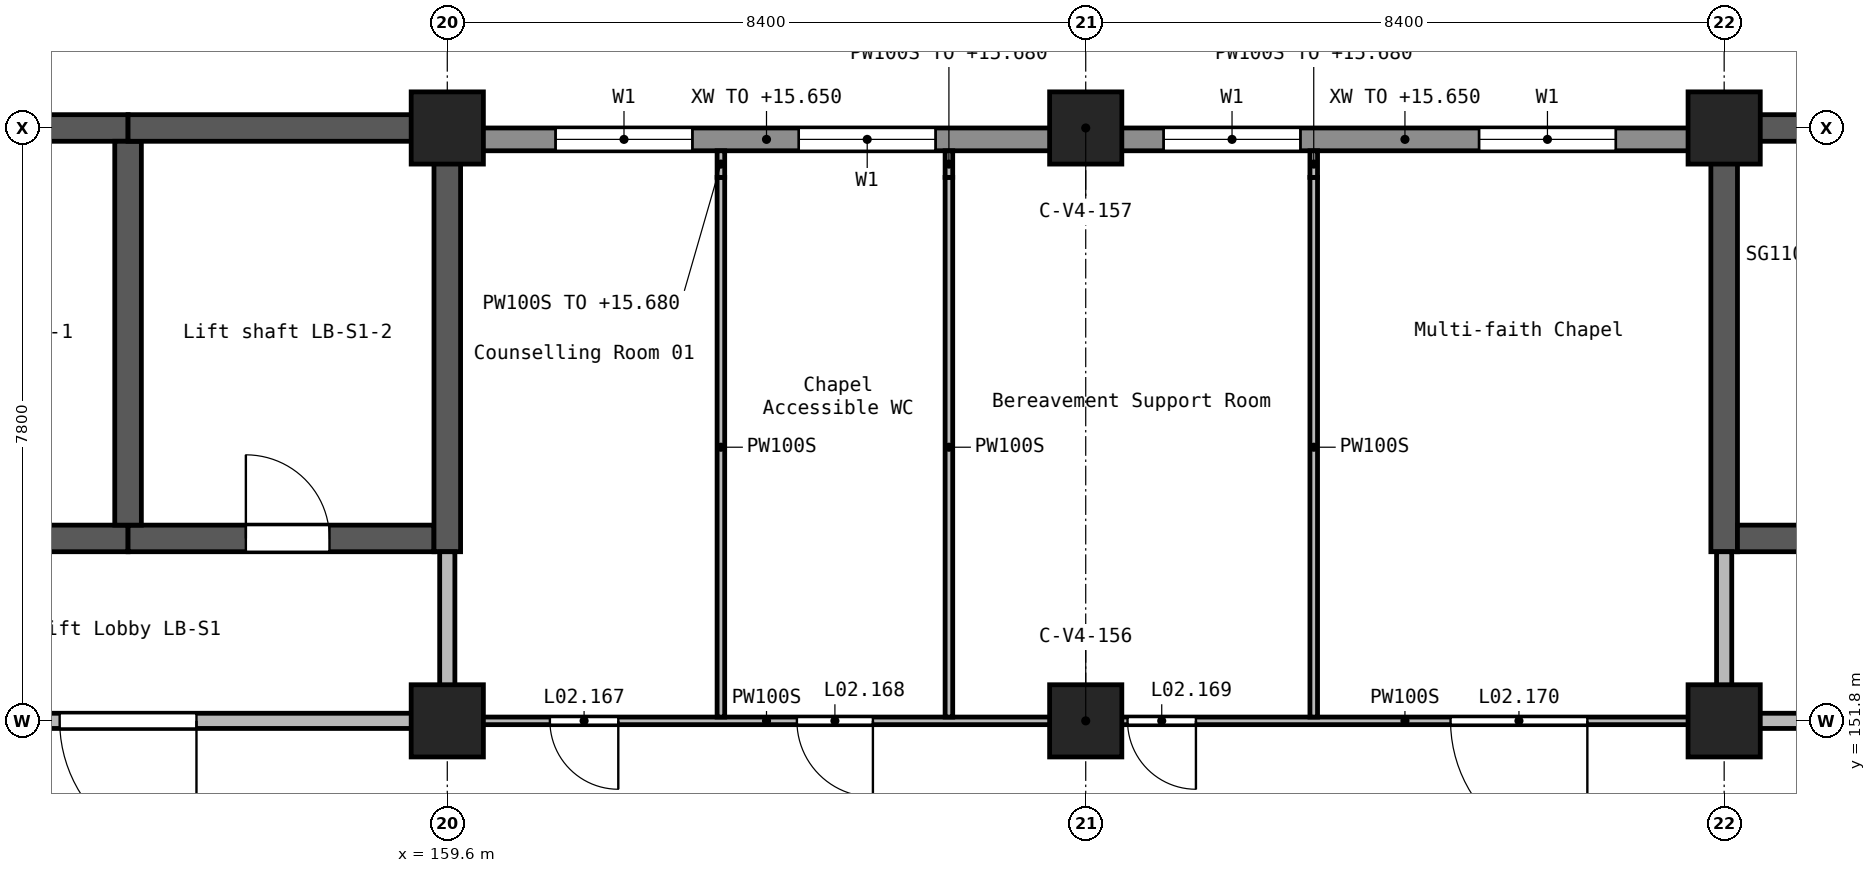
"""IFC4 building model, lengths in metres.
Left out: names, types, materials, properties, quantities, classifications, styles, units other than length and angle.
Written with IfcOpenShell. Run it as: python <this file> out.ifc"""

import sys

from ifc_helpers import new_model, si_unit, direction, frame, frame_2d, origin, origin_2d, place, context, subcontext, project, spatial, rectangle, extrude, element, fill, save


model = new_model("IFC4")
c1 = context("Model", 3, precision=1e-05, world=origin(), true_north=direction((0.0, 1.0)))
c2 = subcontext(c1, "Body", "Model", "MODEL_VIEW")
j1 = project(units=[si_unit("LENGTHUNIT", "METRE"), si_unit("PLANEANGLEUNIT", "RADIAN")], contexts=[c1])
p1 = place(None, origin())
s1 = spatial("IfcSite", under=j1, at=p1, CompositionType="ELEMENT")
p2 = place(p1, origin())
s2 = spatial("IfcBuilding", under=s1, at=p2, CompositionType="ELEMENT")
p3 = place(p2, frame((0.0, 0.0, 12.6)))
s3 = spatial("IfcBuildingStorey", under=s2, at=p3, CompositionType="ELEMENT", Elevation=12.6)
for number, where, z_axis, x_axis in (
    (1, (159.6, 151.8, 0.0), (0.0, 0.0, 1.0), (1.0, 0.0, 0.0)),
    (2, (159.6, 159.6, 0.0), (0.0, 0.0, 1.0), (1.0, 0.0, 0.0)),
    (3, (168.0, 151.8, 0.0), (0.0, 0.0, 1.0), (1.0, 0.0, 0.0)),
    (4, (168.0, 159.6, 0.0), (0.0, 0.0, 1.0), (1.0, 0.0, 0.0)),
    (5, (176.4, 151.8, 0.0), (0.0, 0.0, 1.0), (1.0, 0.0, 0.0)),
    (6, (176.4, 159.6, 0.0), (0.0, 0.0, 1.0), (1.0, 0.0, 0.0)),
):
    element("IfcColumn", number, at=place(p3, frame(where, z_axis=z_axis, x_axis=x_axis)), inside=s3, PredefinedType="COLUMN", context=c2, shape_type="SweptSolid", body=[
        extrude(rectangle(XDim=0.95, YDim=0.95, at=origin_2d()), origin(), (0.0, 0.0, 1.0), 4.2),
    ])
p4 = place(p3, frame((151.2, 154.2, 0.0), z_axis=(0.0, 0.0, 1.0), x_axis=(1.0, 0.0, 0.0)))
e7 = element("IfcWall", 7, at=p4, inside=s3, PredefinedType="SHEAR", context=c2, shape_type="SweptSolid", body=[
    extrude(rectangle(XDim=4.2, YDim=0.35, at=frame_2d((2.1, 0.0))), origin(), (0.0, 0.0, 1.0), 4.2),
])
p5 = place(p4, frame((1.55, 0.0, 0.0)))
e8 = element("IfcOpeningElement", 8, at=p5, cuts=e7, PredefinedType="OPENING", context=c2, shape_type="SweptSolid", body=[
    extrude(rectangle(XDim=1.1, YDim=2.1, at=frame_2d((0.55, 1.05))), frame((0.0, 0.185, 0.0), z_axis=(0.0, -1.0, 0.0), x_axis=(1.0, 0.0, 0.0)), (0.0, 0.0, 1.0), 0.37),
])
p6 = place(p3, frame((151.2, 159.6, 0.0), z_axis=(0.0, 0.0, 1.0), x_axis=(1.0, 0.0, 0.0)))
e9 = element("IfcWall", 9, at=p6, inside=s3, PredefinedType="SHEAR", context=c2, shape_type="SweptSolid", body=[
    extrude(rectangle(XDim=4.2, YDim=0.35, at=frame_2d((2.1, 0.0))), origin(), (0.0, 0.0, 1.0), 4.2),
])
p7 = place(p3, frame((155.4, 154.2, 0.0), z_axis=(0.0, 0.0, 1.0), x_axis=(1.0, 0.0, 0.0)))
e10 = element("IfcWall", 10, at=p7, inside=s3, PredefinedType="SHEAR", context=c2, shape_type="SweptSolid", body=[
    extrude(rectangle(XDim=4.025, YDim=0.35, at=frame_2d((2.013, 0.0))), origin(), (0.0, 0.0, 1.0), 4.2),
])
p8 = place(p7, frame((1.55, 0.0, 0.0)))
e11 = element("IfcOpeningElement", 11, at=p8, cuts=e10, PredefinedType="OPENING", context=c2, shape_type="SweptSolid", body=[
    extrude(rectangle(XDim=1.1, YDim=2.1, at=frame_2d((0.55, 1.05))), frame((0.0, 0.185, 0.0), z_axis=(0.0, -1.0, 0.0), x_axis=(1.0, 0.0, 0.0)), (0.0, 0.0, 1.0), 0.37),
])
p9 = place(p3, frame((155.4, 154.375, 0.0), z_axis=(0.0, 0.0, 1.0), x_axis=(0.0, 1.0, 0.0)))
e12 = element("IfcWall", 12, at=p9, inside=s3, PredefinedType="SHEAR", context=c2, shape_type="SweptSolid", body=[
    extrude(rectangle(XDim=5.05, YDim=0.35, at=frame_2d((2.525, 0.0))), origin(), (0.0, 0.0, 1.0), 4.2),
])
p10 = place(p3, frame((155.4, 159.6, 0.0), z_axis=(0.0, 0.0, 1.0), x_axis=(1.0, 0.0, 0.0)))
e13 = element("IfcWall", 13, at=p10, inside=s3, PredefinedType="SHEAR", context=c2, shape_type="SweptSolid", body=[
    extrude(rectangle(XDim=4.025, YDim=0.35, at=frame_2d((2.013, 0.0))), origin(), (0.0, 0.0, 1.0), 4.2),
])
p11 = place(p3, frame((159.6, 154.025, 0.0), z_axis=(0.0, 0.0, 1.0), x_axis=(0.0, 1.0, 0.0)))
e14 = element("IfcWall", 14, at=p11, inside=s3, PredefinedType="SHEAR", context=c2, shape_type="SweptSolid", body=[
    extrude(rectangle(XDim=5.75, YDim=0.35, at=frame_2d((2.875, 0.0))), origin(), (0.0, 0.0, 1.0), 4.2),
])
p12 = place(p3, frame((176.225, 159.6, 0.0), z_axis=(0.0, 0.0, 1.0), x_axis=(1.0, 0.0, 0.0)))
e15 = element("IfcWall", 15, at=p12, inside=s3, PredefinedType="SHEAR", context=c2, shape_type="SweptSolid", body=[
    extrude(rectangle(XDim=8.4, YDim=0.35, at=frame_2d((4.2, 0.0))), origin(), (0.0, 0.0, 1.0), 4.2),
])
p13 = place(p3, frame((176.4, 154.025, 0.0), z_axis=(0.0, 0.0, 1.0), x_axis=(0.0, 1.0, 0.0)))
e16 = element("IfcWall", 16, at=p13, inside=s3, PredefinedType="SHEAR", context=c2, shape_type="SweptSolid", body=[
    extrude(rectangle(XDim=5.4, YDim=0.35, at=frame_2d((2.7, 0.0))), origin(), (0.0, 0.0, 1.0), 4.2),
])
p14 = place(p3, frame((176.575, 154.2, 0.0), z_axis=(0.0, 0.0, 1.0), x_axis=(1.0, 0.0, 0.0)))
e17 = element("IfcWall", 17, at=p14, inside=s3, PredefinedType="SHEAR", context=c2, shape_type="SweptSolid", body=[
    extrude(rectangle(XDim=8.05, YDim=0.35, at=frame_2d((4.025, 0.0))), origin(), (0.0, 0.0, 1.0), 4.2),
])
p15 = place(p14, frame((6.525, 0.0, 0.0)))
e18 = element("IfcOpeningElement", 18, at=p15, cuts=e17, PredefinedType="OPENING", context=c2, shape_type="SweptSolid", body=[
    extrude(rectangle(XDim=1.1, YDim=2.1, at=frame_2d((0.55, 1.05))), frame((0.0, 0.185, 0.0), z_axis=(0.0, -1.0, 0.0), x_axis=(1.0, 0.0, 0.0)), (0.0, 0.0, 1.0), 0.37),
])
p16 = place(p3, frame((175.95, 159.45, 0.0), z_axis=(0.0, 0.0, 1.0), x_axis=(-1.0, 0.0, 0.0)))
e19 = element("IfcWall", 19, at=p16, inside=s3, PredefinedType="STANDARD", context=c2, shape_type="SweptSolid", body=[
    extrude(rectangle(XDim=7.5, YDim=0.3, at=frame_2d((3.75, 0.0))), origin(), (0.0, 0.0, 1.0), 3.05),
])
p17 = place(p16, frame((0.975, 0.0, 0.9)))
e20 = element("IfcOpeningElement", 20, at=p17, cuts=e19, PredefinedType="OPENING", context=c2, shape_type="SweptSolid", body=[
    extrude(rectangle(XDim=1.8, YDim=1.5, at=frame_2d((0.9, 0.75))), frame((0.0, 0.16, 0.0), z_axis=(0.0, -1.0, 0.0), x_axis=(1.0, 0.0, 0.0)), (0.0, 0.0, 1.0), 0.32),
])
p18 = place(p16, frame((5.125, 0.0, 0.9)))
e21 = element("IfcOpeningElement", 21, at=p18, cuts=e19, PredefinedType="OPENING", context=c2, shape_type="SweptSolid", body=[
    extrude(rectangle(XDim=1.8, YDim=1.5, at=frame_2d((0.9, 0.75))), frame((0.0, 0.16, 0.0), z_axis=(0.0, -1.0, 0.0), x_axis=(1.0, 0.0, 0.0)), (0.0, 0.0, 1.0), 0.32),
])
p19 = place(p3, frame((167.55, 159.45, 0.0), z_axis=(0.0, 0.0, 1.0), x_axis=(-1.0, 0.0, 0.0)))
e22 = element("IfcWall", 22, at=p19, inside=s3, PredefinedType="STANDARD", context=c2, shape_type="SweptSolid", body=[
    extrude(rectangle(XDim=7.5, YDim=0.3, at=frame_2d((3.75, 0.0))), origin(), (0.0, 0.0, 1.0), 3.05),
])
p20 = place(p19, frame((1.525, 0.0, 0.9)))
e23 = element("IfcOpeningElement", 23, at=p20, cuts=e22, PredefinedType="OPENING", context=c2, shape_type="SweptSolid", body=[
    extrude(rectangle(XDim=1.8, YDim=1.5, at=frame_2d((0.9, 0.75))), frame((0.0, 0.16, 0.0), z_axis=(0.0, -1.0, 0.0), x_axis=(1.0, 0.0, 0.0)), (0.0, 0.0, 1.0), 0.32),
])
p21 = place(p19, frame((4.725, 0.0, 0.9)))
e24 = element("IfcOpeningElement", 24, at=p21, cuts=e22, PredefinedType="OPENING", context=c2, shape_type="SweptSolid", body=[
    extrude(rectangle(XDim=1.8, YDim=1.5, at=frame_2d((0.9, 0.75))), frame((0.0, 0.16, 0.0), z_axis=(0.0, -1.0, 0.0), x_axis=(1.0, 0.0, 0.0)), (0.0, 0.0, 1.0), 0.32),
])
p22 = place(p3, frame((159.15, 151.8, 0.0), z_axis=(0.0, 0.0, 1.0), x_axis=(-1.0, 0.0, 0.0)))
e25 = element("IfcWall", 25, at=p22, inside=s3, PredefinedType="SOLIDWALL", context=c2, shape_type="SweptSolid", body=[
    extrude(rectangle(XDim=7.5, YDim=0.2, at=frame_2d((3.75, 0.0))), origin(), (0.0, 0.0, 1.0), 3.85),
])
p23 = place(p22, frame((2.85, 0.0, 0.0)))
e26 = element("IfcOpeningElement", 26, at=p23, cuts=e25, PredefinedType="OPENING", context=c2, shape_type="SweptSolid", body=[
    extrude(rectangle(XDim=1.8, YDim=2.1, at=frame_2d((0.9, 1.05))), frame((0.0, 0.11, 0.0), z_axis=(0.0, -1.0, 0.0), x_axis=(1.0, 0.0, 0.0)), (0.0, 0.0, 1.0), 0.22),
])
p24 = place(p3, frame((176.85, 151.8, 0.0), z_axis=(0.0, 0.0, 1.0), x_axis=(1.0, 0.0, 0.0)))
e27 = element("IfcWall", 27, at=p24, inside=s3, PredefinedType="SOLIDWALL", context=c2, shape_type="SweptSolid", body=[
    extrude(rectangle(XDim=7.5, YDim=0.2, at=frame_2d((3.75, 0.0))), origin(), (0.0, 0.0, 1.0), 3.85),
])
p25 = place(p24, frame((3.2, 0.0, 0.0)))
e28 = element("IfcOpeningElement", 28, at=p25, cuts=e27, PredefinedType="OPENING", context=c2, shape_type="SweptSolid", body=[
    extrude(rectangle(XDim=1.1, YDim=2.1, at=frame_2d((0.55, 1.05))), frame((0.0, 0.11, 0.0), z_axis=(0.0, -1.0, 0.0), x_axis=(1.0, 0.0, 0.0)), (0.0, 0.0, 1.0), 0.22),
])
for number, where, z_axis, x_axis in (
    (29, (159.6, 152.25, 0.0), (0.0, 0.0, 1.0), (0.0, 1.0, 0.0)),
    (30, (176.4, 152.25, 0.0), (0.0, 0.0, 1.0), (0.0, 1.0, 0.0)),
):
    element("IfcWall", number, at=place(p3, frame(where, z_axis=z_axis, x_axis=x_axis)), inside=s3, PredefinedType="SOLIDWALL", context=c2, shape_type="SweptSolid", body=[
        extrude(rectangle(XDim=1.775, YDim=0.2, at=frame_2d((0.887, 0.0))), origin(), (0.0, 0.0, 1.0), 3.85),
    ])
p26 = place(p3, frame((175.95, 151.8, 0.0), z_axis=(0.0, 0.0, 1.0), x_axis=(-1.0, 0.0, 0.0)))
e31 = element("IfcWall", 31, at=p26, inside=s3, PredefinedType="PARTITIONING", context=c2, shape_type="SweptSolid", body=[
    extrude(rectangle(XDim=7.5, YDim=0.1, at=frame_2d((3.75, 0.0))), origin(), (0.0, 0.0, 1.0), 3.85),
])
p27 = place(p26, frame((6.5, 0.0, 0.0)))
e32 = element("IfcOpeningElement", 32, at=p27, cuts=e31, PredefinedType="OPENING", context=c2, shape_type="SweptSolid", body=[
    extrude(rectangle(XDim=0.9, YDim=2.1, at=frame_2d((0.45, 1.05))), frame((0.0, 0.06, 0.0), z_axis=(0.0, -1.0, 0.0), x_axis=(1.0, 0.0, 0.0)), (0.0, 0.0, 1.0), 0.12),
])
p28 = place(p26, frame((1.35, 0.0, 0.0)))
e33 = element("IfcOpeningElement", 33, at=p28, cuts=e31, PredefinedType="OPENING", context=c2, shape_type="SweptSolid", body=[
    extrude(rectangle(XDim=1.8, YDim=2.1, at=frame_2d((0.9, 1.05))), frame((0.0, 0.06, 0.0), z_axis=(0.0, -1.0, 0.0), x_axis=(1.0, 0.0, 0.0)), (0.0, 0.0, 1.0), 0.12),
])
p29 = place(p3, frame((167.55, 151.8, 0.0), z_axis=(0.0, 0.0, 1.0), x_axis=(-1.0, 0.0, 0.0)))
e34 = element("IfcWall", 34, at=p29, inside=s3, PredefinedType="PARTITIONING", context=c2, shape_type="SweptSolid", body=[
    extrude(rectangle(XDim=7.5, YDim=0.1, at=frame_2d((3.75, 0.0))), origin(), (0.0, 0.0, 1.0), 3.85),
])
p30 = place(p29, frame((5.7, 0.0, 0.0)))
e35 = element("IfcOpeningElement", 35, at=p30, cuts=e34, PredefinedType="OPENING", context=c2, shape_type="SweptSolid", body=[
    extrude(rectangle(XDim=0.9, YDim=2.1, at=frame_2d((0.45, 1.05))), frame((0.0, 0.06, 0.0), z_axis=(0.0, -1.0, 0.0), x_axis=(1.0, 0.0, 0.0)), (0.0, 0.0, 1.0), 0.12),
])
p31 = place(p29, frame((2.35, 0.0, 0.0)))
e36 = element("IfcOpeningElement", 36, at=p31, cuts=e34, PredefinedType="OPENING", context=c2, shape_type="SweptSolid", body=[
    extrude(rectangle(XDim=1.0, YDim=2.1, at=frame_2d((0.5, 1.05))), frame((0.0, 0.06, 0.0), z_axis=(0.0, -1.0, 0.0), x_axis=(1.0, 0.0, 0.0)), (0.0, 0.0, 1.0), 0.12),
])
p32 = place(p3, frame((163.2, 151.85, 0.0), z_axis=(0.0, 0.0, 1.0), x_axis=(0.0, 1.0, 0.0)))
e37 = element("IfcWall", 37, at=p32, inside=s3, PredefinedType="PARTITIONING", context=c2, shape_type="SweptSolid", body=[
    extrude(rectangle(XDim=7.1, YDim=0.1, at=frame_2d((3.55, 0.0))), origin(), (0.0, 0.0, 1.0), 3.85),
])
p33 = place(p3, frame((163.2, 158.95, 0.0), z_axis=(0.0, 0.0, 1.0), x_axis=(0.0, 1.0, 0.0)))
e38 = element("IfcWall", 38, at=p33, inside=s3, PredefinedType="PARTITIONING", context=c2, shape_type="SweptSolid", body=[
    extrude(rectangle(XDim=0.35, YDim=0.1, at=frame_2d((0.175, 0.0))), origin(), (0.0, 0.0, 1.0), 3.08),
])
p34 = place(p3, frame((166.2, 151.85, 0.0), z_axis=(0.0, 0.0, 1.0), x_axis=(0.0, 1.0, 0.0)))
e39 = element("IfcWall", 39, at=p34, inside=s3, PredefinedType="PARTITIONING", context=c2, shape_type="SweptSolid", body=[
    extrude(rectangle(XDim=7.1, YDim=0.1, at=frame_2d((3.55, 0.0))), origin(), (0.0, 0.0, 1.0), 3.85),
])
p35 = place(p3, frame((166.2, 158.95, 0.0), z_axis=(0.0, 0.0, 1.0), x_axis=(0.0, 1.0, 0.0)))
e40 = element("IfcWall", 40, at=p35, inside=s3, PredefinedType="PARTITIONING", context=c2, shape_type="SweptSolid", body=[
    extrude(rectangle(XDim=0.35, YDim=0.1, at=frame_2d((0.175, 0.0))), origin(), (0.0, 0.0, 1.0), 3.08),
])
p36 = place(p3, frame((171.0, 151.85, 0.0), z_axis=(0.0, 0.0, 1.0), x_axis=(0.0, 1.0, 0.0)))
e41 = element("IfcWall", 41, at=p36, inside=s3, PredefinedType="PARTITIONING", context=c2, shape_type="SweptSolid", body=[
    extrude(rectangle(XDim=7.1, YDim=0.1, at=frame_2d((3.55, 0.0))), origin(), (0.0, 0.0, 1.0), 3.85),
])
p37 = place(p3, frame((171.0, 158.95, 0.0), z_axis=(0.0, 0.0, 1.0), x_axis=(0.0, 1.0, 0.0)))
e42 = element("IfcWall", 42, at=p37, inside=s3, PredefinedType="PARTITIONING", context=c2, shape_type="SweptSolid", body=[
    extrude(rectangle(XDim=0.35, YDim=0.1, at=frame_2d((0.175, 0.0))), origin(), (0.0, 0.0, 1.0), 3.08),
])
p38 = place(p17, origin())
e43 = element("IfcWindow", 43, at=p38, inside=s3, PartitioningType="SINGLE_PANEL", PredefinedType="WINDOW", context=c2, shape_type="SweptSolid", body=[
    extrude(rectangle(XDim=1.8, YDim=1.5, at=frame_2d((0.9, 0.75))), frame((0.0, 0.03, 0.0), z_axis=(0.0, -1.0, 0.0), x_axis=(1.0, 0.0, 0.0)), (0.0, 0.0, 1.0), 0.06),
])
fill(e20, e43)
p39 = place(p18, origin())
e44 = element("IfcWindow", 44, at=p39, inside=s3, PartitioningType="SINGLE_PANEL", PredefinedType="WINDOW", context=c2, shape_type="SweptSolid", body=[
    extrude(rectangle(XDim=1.8, YDim=1.5, at=frame_2d((0.9, 0.75))), frame((0.0, 0.03, 0.0), z_axis=(0.0, -1.0, 0.0), x_axis=(1.0, 0.0, 0.0)), (0.0, 0.0, 1.0), 0.06),
])
fill(e21, e44)
p40 = place(p20, origin())
e45 = element("IfcWindow", 45, at=p40, inside=s3, PartitioningType="SINGLE_PANEL", PredefinedType="WINDOW", context=c2, shape_type="SweptSolid", body=[
    extrude(rectangle(XDim=1.8, YDim=1.5, at=frame_2d((0.9, 0.75))), frame((0.0, 0.03, 0.0), z_axis=(0.0, -1.0, 0.0), x_axis=(1.0, 0.0, 0.0)), (0.0, 0.0, 1.0), 0.06),
])
fill(e23, e45)
p41 = place(p21, origin())
e46 = element("IfcWindow", 46, at=p41, inside=s3, PartitioningType="SINGLE_PANEL", PredefinedType="WINDOW", context=c2, shape_type="SweptSolid", body=[
    extrude(rectangle(XDim=1.8, YDim=1.5, at=frame_2d((0.9, 0.75))), frame((0.0, 0.03, 0.0), z_axis=(0.0, -1.0, 0.0), x_axis=(1.0, 0.0, 0.0)), (0.0, 0.0, 1.0), 0.06),
])
fill(e24, e46)
p42 = place(p8, origin())
e47 = element("IfcDoor", 47, at=p42, inside=s3, OperationType="DOUBLE_DOOR_SLIDING", PredefinedType="DOOR", context=c2, shape_type="SweptSolid", body=[
    extrude(rectangle(XDim=1.1, YDim=2.1, at=frame_2d((0.55, 1.05))), frame((0.0, 0.025, 0.0), z_axis=(0.0, -1.0, 0.0), x_axis=(1.0, 0.0, 0.0)), (0.0, 0.0, 1.0), 0.05),
])
fill(e11, e47)
p43 = place(p23, frame((1.8, 0.0, 0.0), z_axis=(0.0, 0.0, 1.0), x_axis=(-1.0, 0.0, 0.0)))
e48 = element("IfcDoor", 48, at=p43, inside=s3, OperationType="DOUBLE_DOOR_SINGLE_SWING", PredefinedType="DOOR", context=c2, shape_type="SweptSolid", body=[
    extrude(rectangle(XDim=1.8, YDim=2.1, at=frame_2d((0.9, 1.05))), frame((0.0, 0.025, 0.0), z_axis=(0.0, -1.0, 0.0), x_axis=(1.0, 0.0, 0.0)), (0.0, 0.0, 1.0), 0.05),
])
fill(e26, e48)
p44 = place(p30, frame((0.9, 0.0, 0.0), z_axis=(0.0, 0.0, 1.0), x_axis=(-1.0, 0.0, 0.0)))
e49 = element("IfcDoor", 49, at=p44, inside=s3, OperationType="SINGLE_SWING_LEFT", PredefinedType="DOOR", context=c2, shape_type="SweptSolid", body=[
    extrude(rectangle(XDim=0.9, YDim=2.1, at=frame_2d((0.45, 1.05))), frame((0.0, 0.025, 0.0), z_axis=(0.0, -1.0, 0.0), x_axis=(1.0, 0.0, 0.0)), (0.0, 0.0, 1.0), 0.05),
])
fill(e35, e49)
p45 = place(p31, frame((1.0, 0.0, 0.0), z_axis=(0.0, 0.0, 1.0), x_axis=(-1.0, 0.0, 0.0)))
e50 = element("IfcDoor", 50, at=p45, inside=s3, OperationType="SINGLE_SWING_RIGHT", PredefinedType="DOOR", context=c2, shape_type="SweptSolid", body=[
    extrude(rectangle(XDim=1.0, YDim=2.1, at=frame_2d((0.5, 1.05))), frame((0.0, 0.025, 0.0), z_axis=(0.0, -1.0, 0.0), x_axis=(1.0, 0.0, 0.0)), (0.0, 0.0, 1.0), 0.05),
])
fill(e36, e50)
p46 = place(p27, frame((0.9, 0.0, 0.0), z_axis=(0.0, 0.0, 1.0), x_axis=(-1.0, 0.0, 0.0)))
e51 = element("IfcDoor", 51, at=p46, inside=s3, OperationType="SINGLE_SWING_LEFT", PredefinedType="DOOR", context=c2, shape_type="SweptSolid", body=[
    extrude(rectangle(XDim=0.9, YDim=2.1, at=frame_2d((0.45, 1.05))), frame((0.0, 0.025, 0.0), z_axis=(0.0, -1.0, 0.0), x_axis=(1.0, 0.0, 0.0)), (0.0, 0.0, 1.0), 0.05),
])
fill(e32, e51)
p47 = place(p28, frame((1.8, 0.0, 0.0), z_axis=(0.0, 0.0, 1.0), x_axis=(-1.0, 0.0, 0.0)))
e52 = element("IfcDoor", 52, at=p47, inside=s3, OperationType="DOUBLE_DOOR_SINGLE_SWING", PredefinedType="DOOR", context=c2, shape_type="SweptSolid", body=[
    extrude(rectangle(XDim=1.8, YDim=2.1, at=frame_2d((0.9, 1.05))), frame((0.0, 0.025, 0.0), z_axis=(0.0, -1.0, 0.0), x_axis=(1.0, 0.0, 0.0)), (0.0, 0.0, 1.0), 0.05),
])
fill(e33, e52)
save(model, sys.argv[1])
